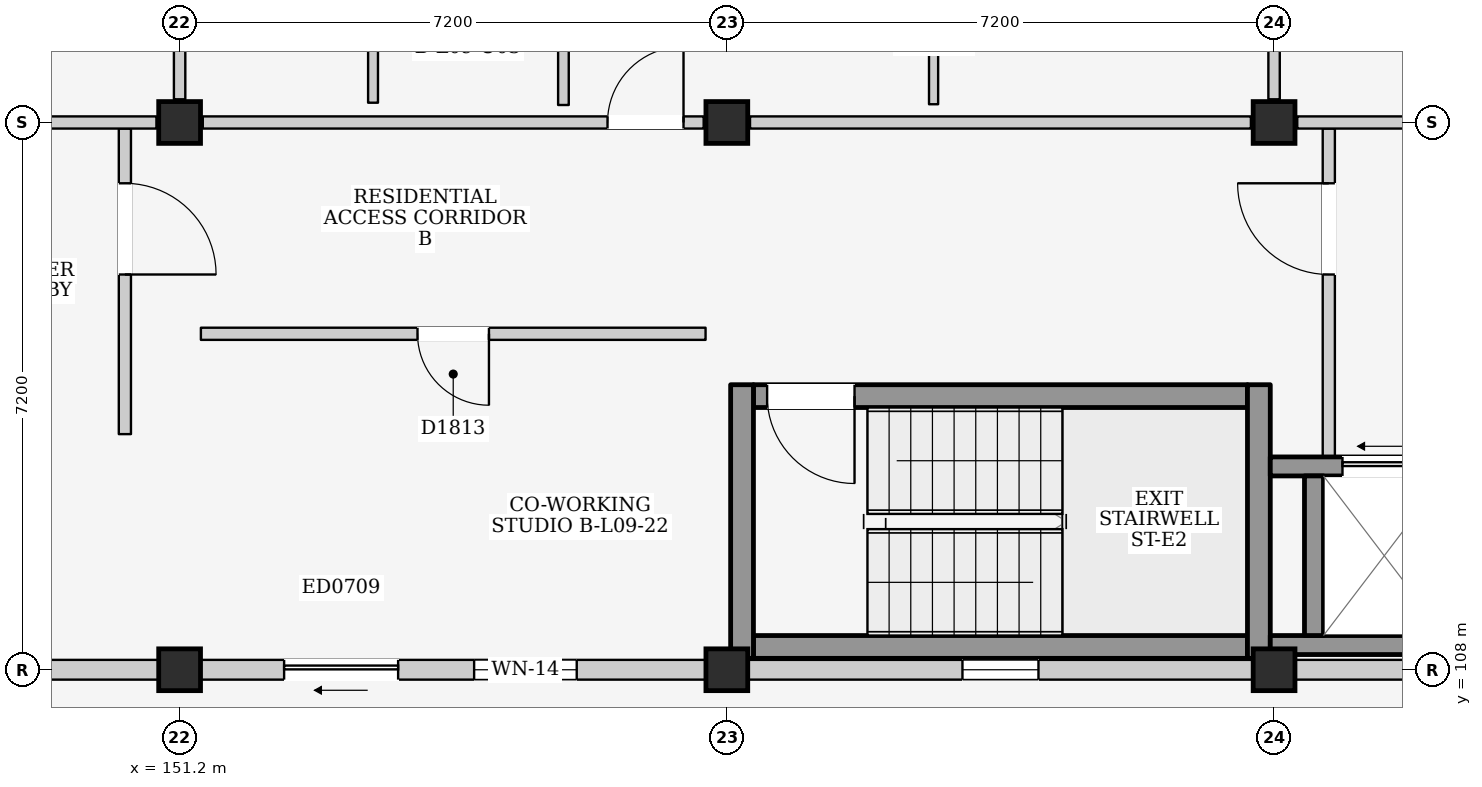
"""IFC4 building model, lengths in metres.
Left out: names, types, materials, properties, quantities, classifications, styles, units other than length and angle.
Written with IfcOpenShell. Run it as: python <this file> out.ifc"""

import sys

from ifc_helpers import new_model, si_unit, direction, frame, frame_2d, origin, origin_2d, place, context, subcontext, project, spatial, rectangle, extrude, element, fill, save


model = new_model("IFC4")
c1 = context("Model", 3, precision=1e-05, world=origin(), true_north=direction((0.0, 1.0)))
c2 = subcontext(c1, "Body", "Model", "MODEL_VIEW")
j1 = project(units=[si_unit("LENGTHUNIT", "METRE"), si_unit("PLANEANGLEUNIT", "RADIAN")], contexts=[c1])
p1 = place(None, origin())
s1 = spatial("IfcSite", under=j1, at=p1, CompositionType="ELEMENT")
p2 = place(p1, origin())
s2 = spatial("IfcBuilding", under=s1, at=p2, CompositionType="ELEMENT")
p3 = place(p2, frame((0.0, 0.0, 31.5)))
s3 = spatial("IfcBuildingStorey", under=s2, at=p3, CompositionType="ELEMENT", Elevation=31.5)
for number, where, z_axis, x_axis in (
    (1, (151.2, 108.0, 0.0), (0.0, 0.0, 1.0), (1.0, 0.0, 0.0)),
    (2, (151.2, 115.2, 0.0), (0.0, 0.0, 1.0), (1.0, 0.0, 0.0)),
    (3, (158.4, 108.0, 0.0), (0.0, 0.0, 1.0), (1.0, 0.0, 0.0)),
    (4, (158.4, 115.2, 0.0), (0.0, 0.0, 1.0), (1.0, 0.0, 0.0)),
    (5, (165.6, 108.0, 0.0), (0.0, 0.0, 1.0), (1.0, 0.0, 0.0)),
    (6, (165.6, 115.2, 0.0), (0.0, 0.0, 1.0), (1.0, 0.0, 0.0)),
):
    element("IfcColumn", number, at=place(p3, frame(where, z_axis=z_axis, x_axis=x_axis)), inside=s3, PredefinedType="COLUMN", context=c2, shape_type="SweptSolid", body=[
        extrude(rectangle(XDim=0.55, YDim=0.55, at=origin_2d()), origin(), (0.0, 0.0, 1.0), 3.3),
    ])
p4 = place(p3, frame((144.275, 108.0, 0.0), z_axis=(0.0, 0.0, 1.0), x_axis=(1.0, 0.0, 0.0)))
e7 = element("IfcWall", 7, at=p4, inside=s3, PredefinedType="ELEMENTEDWALL", context=c2, shape_type="SweptSolid", body=[
    extrude(rectangle(XDim=6.65, YDim=0.26, at=frame_2d((3.325, 0.0))), origin(), (0.0, 0.0, 1.0), 2.465),
])
p5 = place(p4, frame((2.825, 0.0, 1.2)))
e8 = element("IfcOpeningElement", 8, at=p5, cuts=e7, PredefinedType="OPENING", context=c2, shape_type="SweptSolid", body=[
    extrude(rectangle(XDim=1.0, YDim=0.9, at=frame_2d((0.5, 0.45))), frame((0.0, 0.145, 0.0), z_axis=(0.0, -1.0, 0.0), x_axis=(1.0, 0.0, 0.0)), (0.0, 0.0, 1.0), 0.29),
])
p6 = place(p3, frame((151.475, 108.0, 0.0), z_axis=(0.0, 0.0, 1.0), x_axis=(1.0, 0.0, 0.0)))
e9 = element("IfcWall", 9, at=p6, inside=s3, PredefinedType="ELEMENTEDWALL", context=c2, shape_type="SweptSolid", body=[
    extrude(rectangle(XDim=6.65, YDim=0.26, at=frame_2d((3.325, 0.0))), origin(), (0.0, 0.0, 1.0), 2.465),
])
p7 = place(p6, frame((1.1, 0.0, 0.0)))
e10 = element("IfcOpeningElement", 10, at=p7, cuts=e9, PredefinedType="OPENING", context=c2, shape_type="SweptSolid", body=[
    extrude(rectangle(XDim=1.5, YDim=2.12, at=frame_2d((0.75, 1.06))), frame((0.0, 0.145, 0.0), z_axis=(0.0, -1.0, 0.0), x_axis=(1.0, 0.0, 0.0)), (0.0, 0.0, 1.0), 0.29),
])
p8 = place(p6, frame((3.6, 0.0, 0.855)))
e11 = element("IfcOpeningElement", 11, at=p8, cuts=e9, PredefinedType="OPENING", context=c2, shape_type="SweptSolid", body=[
    extrude(rectangle(XDim=1.35, YDim=1.5, at=frame_2d((0.675, 0.75))), frame((0.0, 0.145, 0.0), z_axis=(0.0, -1.0, 0.0), x_axis=(1.0, 0.0, 0.0)), (0.0, 0.0, 1.0), 0.29),
])
p9 = place(p3, frame((158.675, 108.0, 0.0), z_axis=(0.0, 0.0, 1.0), x_axis=(1.0, 0.0, 0.0)))
e12 = element("IfcWall", 12, at=p9, inside=s3, PredefinedType="ELEMENTEDWALL", context=c2, shape_type="SweptSolid", body=[
    extrude(rectangle(XDim=6.65, YDim=0.26, at=frame_2d((3.325, 0.0))), origin(), (0.0, 0.0, 1.0), 2.465),
])
p10 = place(p9, frame((2.825, 0.0, 1.2)))
e13 = element("IfcOpeningElement", 13, at=p10, cuts=e12, PredefinedType="OPENING", context=c2, shape_type="SweptSolid", body=[
    extrude(rectangle(XDim=1.0, YDim=0.9, at=frame_2d((0.5, 0.45))), frame((0.0, 0.145, 0.0), z_axis=(0.0, -1.0, 0.0), x_axis=(1.0, 0.0, 0.0)), (0.0, 0.0, 1.0), 0.29),
])
p11 = place(p3, frame((165.875, 108.0, 0.0), z_axis=(0.0, 0.0, 1.0), x_axis=(1.0, 0.0, 0.0)))
e14 = element("IfcWall", 14, at=p11, inside=s3, PredefinedType="ELEMENTEDWALL", context=c2, shape_type="SweptSolid", body=[
    extrude(rectangle(XDim=6.65, YDim=0.26, at=frame_2d((3.325, 0.0))), origin(), (0.0, 0.0, 1.0), 2.465),
])
p12 = place(p11, frame((2.825, 0.0, 1.2)))
e15 = element("IfcOpeningElement", 15, at=p12, cuts=e14, PredefinedType="OPENING", context=c2, shape_type="SweptSolid", body=[
    extrude(rectangle(XDim=1.0, YDim=0.9, at=frame_2d((0.5, 0.45))), frame((0.0, 0.145, 0.0), z_axis=(0.0, -1.0, 0.0), x_axis=(1.0, 0.0, 0.0)), (0.0, 0.0, 1.0), 0.29),
])
p13 = place(p3, frame((150.48, 111.1, 0.0), z_axis=(0.0, 0.0, 1.0), x_axis=(0.0, 1.0, 0.0)))
e16 = element("IfcWall", 16, at=p13, inside=s3, PredefinedType="PARTITIONING", context=c2, shape_type="SweptSolid", body=[
    extrude(rectangle(XDim=4.02, YDim=0.16, at=frame_2d((2.01, 0.0))), origin(), (0.0, 0.0, 1.0), 3.08),
])
p14 = place(p13, frame((2.1, 0.0, 0.0)))
e17 = element("IfcOpeningElement", 17, at=p14, cuts=e16, PredefinedType="OPENING", context=c2, shape_type="SweptSolid", body=[
    extrude(rectangle(XDim=1.2, YDim=2.2, at=frame_2d((0.6, 1.1))), frame((0.0, 0.095, 0.0), z_axis=(0.0, -1.0, 0.0), x_axis=(1.0, 0.0, 0.0)), (0.0, 0.0, 1.0), 0.19),
])
p15 = place(p3, frame((158.75, 108.3, 0.0), z_axis=(0.0, 0.0, 1.0), x_axis=(1.0, 0.0, 0.0)))
e18 = element("IfcWall", 18, at=p15, inside=s3, PredefinedType="SHEAR", context=c2, shape_type="SweptSolid", body=[
    extrude(rectangle(XDim=6.5, YDim=0.3, at=frame_2d((3.25, 0.0))), origin(), (0.0, 0.0, 1.0), 3.08),
])
p16 = place(p3, frame((158.75, 111.6, 0.0), z_axis=(0.0, 0.0, 1.0), x_axis=(1.0, 0.0, 0.0)))
e19 = element("IfcWall", 19, at=p16, inside=s3, PredefinedType="SHEAR", context=c2, shape_type="SweptSolid", body=[
    extrude(rectangle(XDim=6.5, YDim=0.3, at=frame_2d((3.25, 0.0))), origin(), (0.0, 0.0, 1.0), 3.08),
])
p17 = place(p16, frame((0.18, 0.0, 0.0)))
e20 = element("IfcOpeningElement", 20, at=p17, cuts=e19, PredefinedType="OPENING", context=c2, shape_type="SweptSolid", body=[
    extrude(rectangle(XDim=1.15, YDim=2.2, at=frame_2d((0.575, 1.1))), frame((0.0, 0.165, 0.0), z_axis=(0.0, -1.0, 0.0), x_axis=(1.0, 0.0, 0.0)), (0.0, 0.0, 1.0), 0.33),
])
for number, where, z_axis, x_axis in (
    (21, (158.6, 108.15, 0.0), (0.0, 0.0, 1.0), (0.0, 1.0, 0.0)),
    (22, (165.4, 108.15, 0.0), (0.0, 0.0, 1.0), (0.0, 1.0, 0.0)),
):
    element("IfcWall", number, at=place(p3, frame(where, z_axis=z_axis, x_axis=x_axis)), inside=s3, PredefinedType="SHEAR", context=c2, shape_type="SweptSolid", body=[
        extrude(rectangle(XDim=3.6, YDim=0.3, at=frame_2d((1.8, 0.0))), origin(), (0.0, 0.0, 1.0), 3.08),
    ])
p18 = place(p3, frame((166.32, 110.8, 0.0), z_axis=(0.0, 0.0, 1.0), x_axis=(0.0, 1.0, 0.0)))
e23 = element("IfcWall", 23, at=p18, inside=s3, PredefinedType="PARTITIONING", context=c2, shape_type="SweptSolid", body=[
    extrude(rectangle(XDim=4.32, YDim=0.16, at=frame_2d((2.16, 0.0))), origin(), (0.0, 0.0, 1.0), 3.08),
])
p19 = place(p18, frame((2.4, 0.0, 0.0)))
e24 = element("IfcOpeningElement", 24, at=p19, cuts=e23, PredefinedType="OPENING", context=c2, shape_type="SweptSolid", body=[
    extrude(rectangle(XDim=1.2, YDim=2.2, at=frame_2d((0.6, 1.1))), frame((0.0, 0.095, 0.0), z_axis=(0.0, -1.0, 0.0), x_axis=(1.0, 0.0, 0.0)), (0.0, 0.0, 1.0), 0.19),
])
p20 = place(p3, frame((165.55, 108.325, 0.0), z_axis=(0.0, 0.0, 1.0), x_axis=(1.0, 0.0, 0.0)))
e25 = element("IfcWall", 25, at=p20, inside=s3, PredefinedType="SHEAR", context=c2, shape_type="SweptSolid", body=[
    extrude(rectangle(XDim=2.55, YDim=0.25, at=frame_2d((1.275, 0.0))), origin(), (0.0, 0.0, 1.0), 3.08),
])
p21 = place(p3, frame((165.55, 110.675, 0.0), z_axis=(0.0, 0.0, 1.0), x_axis=(1.0, 0.0, 0.0)))
e26 = element("IfcWall", 26, at=p21, inside=s3, PredefinedType="SHEAR", context=c2, shape_type="SweptSolid", body=[
    extrude(rectangle(XDim=2.55, YDim=0.25, at=frame_2d((1.275, 0.0))), origin(), (0.0, 0.0, 1.0), 3.08),
])
p22 = place(p21, frame((0.95, 0.0, 0.0)))
e27 = element("IfcOpeningElement", 27, at=p22, cuts=e26, PredefinedType="OPENING", context=c2, shape_type="SweptSolid", body=[
    extrude(rectangle(XDim=1.1, YDim=2.15, at=frame_2d((0.55, 1.075))), frame((0.0, 0.14, 0.0), z_axis=(0.0, -1.0, 0.0), x_axis=(1.0, 0.0, 0.0)), (0.0, 0.0, 1.0), 0.28),
])
p23 = place(p3, frame((166.125, 108.45, 0.0), z_axis=(0.0, 0.0, 1.0), x_axis=(0.0, 1.0, 0.0)))
e28 = element("IfcWall", 28, at=p23, inside=s3, PredefinedType="SHEAR", context=c2, shape_type="SweptSolid", body=[
    extrude(rectangle(XDim=2.1, YDim=0.25, at=frame_2d((1.05, 0.0))), origin(), (0.0, 0.0, 1.0), 3.08),
])
p24 = place(p3, frame((144.305, 115.2, 0.0), z_axis=(0.0, 0.0, 1.0), x_axis=(1.0, 0.0, 0.0)))
e29 = element("IfcWall", 29, at=p24, inside=s3, PredefinedType="PARTITIONING", context=c2, shape_type="SweptSolid", body=[
    extrude(rectangle(XDim=6.59, YDim=0.16, at=frame_2d((3.295, 0.0))), origin(), (0.0, 0.0, 1.0), 2.465),
])
p25 = place(p24, frame((4.145, 0.0, 0.0)))
e30 = element("IfcOpeningElement", 30, at=p25, cuts=e29, PredefinedType="OPENING", context=c2, shape_type="SweptSolid", body=[
    extrude(rectangle(XDim=1.0, YDim=2.15, at=frame_2d((0.5, 1.075))), frame((0.0, 0.095, 0.0), z_axis=(0.0, -1.0, 0.0), x_axis=(1.0, 0.0, 0.0)), (0.0, 0.0, 1.0), 0.19),
])
p26 = place(p3, frame((151.2, 115.505, 0.0), z_axis=(0.0, 0.0, 1.0), x_axis=(0.0, 1.0, 0.0)))
e31 = element("IfcWall", 31, at=p26, inside=s3, PredefinedType="PARTITIONING", context=c2, shape_type="SweptSolid", body=[
    extrude(rectangle(XDim=6.59, YDim=0.15, at=frame_2d((3.295, 0.0))), origin(), (0.0, 0.0, 1.0), 2.565),
])
p27 = place(p3, frame((151.505, 115.2, 0.0), z_axis=(0.0, 0.0, 1.0), x_axis=(1.0, 0.0, 0.0)))
e32 = element("IfcWall", 32, at=p27, inside=s3, PredefinedType="PARTITIONING", context=c2, shape_type="SweptSolid", body=[
    extrude(rectangle(XDim=6.59, YDim=0.16, at=frame_2d((3.295, 0.0))), origin(), (0.0, 0.0, 1.0), 2.465),
])
p28 = place(p27, frame((5.325, 0.0, 0.0)))
e33 = element("IfcOpeningElement", 33, at=p28, cuts=e32, PredefinedType="OPENING", context=c2, shape_type="SweptSolid", body=[
    extrude(rectangle(XDim=1.0, YDim=2.15, at=frame_2d((0.5, 1.075))), frame((0.0, 0.095, 0.0), z_axis=(0.0, -1.0, 0.0), x_axis=(1.0, 0.0, 0.0)), (0.0, 0.0, 1.0), 0.19),
])
p29 = place(p3, frame((158.705, 115.2, 0.0), z_axis=(0.0, 0.0, 1.0), x_axis=(1.0, 0.0, 0.0)))
e34 = element("IfcWall", 34, at=p29, inside=s3, PredefinedType="PARTITIONING", context=c2, shape_type="SweptSolid", body=[
    extrude(rectangle(XDim=6.59, YDim=0.16, at=frame_2d((3.295, 0.0))), origin(), (0.0, 0.0, 1.0), 2.465),
])
p30 = place(p3, frame((165.6, 115.505, 0.0), z_axis=(0.0, 0.0, 1.0), x_axis=(0.0, 1.0, 0.0)))
e35 = element("IfcWall", 35, at=p30, inside=s3, PredefinedType="PARTITIONING", context=c2, shape_type="SweptSolid", body=[
    extrude(rectangle(XDim=6.59, YDim=0.15, at=frame_2d((3.295, 0.0))), origin(), (0.0, 0.0, 1.0), 2.565),
])
p31 = place(p3, frame((153.745, 115.46, 0.0), z_axis=(0.0, 0.0, 1.0), x_axis=(0.0, 1.0, 0.0)))
e36 = element("IfcWall", 36, at=p31, inside=s3, PredefinedType="PARTITIONING", context=c2, shape_type="SweptSolid", body=[
    extrude(rectangle(XDim=3.04, YDim=0.13, at=frame_2d((1.52, 0.0))), origin(), (0.0, 0.0, 1.0), 3.08),
])
p32 = place(p3, frame((156.25, 115.43, 0.0), z_axis=(0.0, 0.0, 1.0), x_axis=(0.0, 1.0, 0.0)))
e37 = element("IfcWall", 37, at=p32, inside=s3, PredefinedType="PARTITIONING", context=c2, shape_type="SweptSolid", body=[
    extrude(rectangle(XDim=3.06, YDim=0.14, at=frame_2d((1.53, 0.0))), origin(), (0.0, 0.0, 1.0), 3.08),
])
p33 = place(p3, frame((161.12, 115.44, 0.0), z_axis=(0.0, 0.0, 1.0), x_axis=(0.0, 1.0, 0.0)))
e38 = element("IfcWall", 38, at=p33, inside=s3, PredefinedType="PARTITIONING", context=c2, shape_type="SweptSolid", body=[
    extrude(rectangle(XDim=3.04, YDim=0.12, at=frame_2d((1.52, 0.0))), origin(), (0.0, 0.0, 1.0), 3.08),
])
p34 = place(p33, frame((1.04, 0.0, 0.0)))
e39 = element("IfcOpeningElement", 39, at=p34, cuts=e38, PredefinedType="OPENING", context=c2, shape_type="SweptSolid", body=[
    extrude(rectangle(XDim=0.96, YDim=2.15, at=frame_2d((0.48, 1.075))), frame((0.0, 0.075, 0.0), z_axis=(0.0, -1.0, 0.0), x_axis=(1.0, 0.0, 0.0)), (0.0, 0.0, 1.0), 0.15),
])
p35 = place(p3, frame((165.905, 115.2, 0.0), z_axis=(0.0, 0.0, 1.0), x_axis=(1.0, 0.0, 0.0)))
e40 = element("IfcWall", 40, at=p35, inside=s3, PredefinedType="PARTITIONING", context=c2, shape_type="SweptSolid", body=[
    extrude(rectangle(XDim=6.59, YDim=0.16, at=frame_2d((3.295, 0.0))), origin(), (0.0, 0.0, 1.0), 2.465),
])
p36 = place(p35, frame((4.145, 0.0, 0.0)))
e41 = element("IfcOpeningElement", 41, at=p36, cuts=e40, PredefinedType="OPENING", context=c2, shape_type="SweptSolid", body=[
    extrude(rectangle(XDim=1.0, YDim=2.15, at=frame_2d((0.5, 1.075))), frame((0.0, 0.095, 0.0), z_axis=(0.0, -1.0, 0.0), x_axis=(1.0, 0.0, 0.0)), (0.0, 0.0, 1.0), 0.19),
])
p37 = place(p3, frame((151.48, 112.42, 0.0), z_axis=(0.0, 0.0, 1.0), x_axis=(1.0, 0.0, 0.0)))
e42 = element("IfcWall", 42, at=p37, inside=s3, PredefinedType="PARTITIONING", context=c2, shape_type="SweptSolid", body=[
    extrude(rectangle(XDim=6.64, YDim=0.16, at=frame_2d((3.32, 0.0))), origin(), (0.0, 0.0, 1.0), 3.08),
])
p38 = place(p37, frame((2.85, 0.0, 0.0)))
e43 = element("IfcOpeningElement", 43, at=p38, cuts=e42, PredefinedType="OPENING", context=c2, shape_type="SweptSolid", body=[
    extrude(rectangle(XDim=0.94, YDim=2.12, at=frame_2d((0.47, 1.06))), frame((0.0, 0.095, 0.0), z_axis=(0.0, -1.0, 0.0), x_axis=(1.0, 0.0, 0.0)), (0.0, 0.0, 1.0), 0.19),
])
p39 = place(p7, frame((1.5, 0.0, 0.0), z_axis=(0.0, 0.0, 1.0), x_axis=(-1.0, 0.0, 0.0)))
e44 = element("IfcDoor", 44, at=p39, inside=s3, OperationType="SLIDING_TO_LEFT", PredefinedType="DOOR", context=c2, shape_type="SweptSolid", body=[
    extrude(rectangle(XDim=1.5, YDim=2.12, at=frame_2d((0.75, 1.06))), frame((0.0, 0.025, 0.0), z_axis=(0.0, -1.0, 0.0), x_axis=(1.0, 0.0, 0.0)), (0.0, 0.0, 1.0), 0.05),
])
fill(e10, e44)
p40 = place(p8, origin())
e45 = element("IfcWindow", 45, at=p40, inside=s3, PartitioningType="SINGLE_PANEL", PredefinedType="WINDOW", context=c2, shape_type="SweptSolid", body=[
    extrude(rectangle(XDim=1.35, YDim=1.5, at=frame_2d((0.675, 0.75))), frame((0.0, 0.03, 0.0), z_axis=(0.0, -1.0, 0.0), x_axis=(1.0, 0.0, 0.0)), (0.0, 0.0, 1.0), 0.06),
])
fill(e11, e45)
p41 = place(p10, origin())
e46 = element("IfcWindow", 46, at=p41, inside=s3, PartitioningType="SINGLE_PANEL", PredefinedType="WINDOW", context=c2, shape_type="SweptSolid", body=[
    extrude(rectangle(XDim=1.0, YDim=0.9, at=frame_2d((0.5, 0.45))), frame((0.0, 0.03, 0.0), z_axis=(0.0, -1.0, 0.0), x_axis=(1.0, 0.0, 0.0)), (0.0, 0.0, 1.0), 0.06),
])
fill(e13, e46)
p42 = place(p14, frame((1.2, 0.0, 0.0), z_axis=(0.0, 0.0, 1.0), x_axis=(-1.0, 0.0, 0.0)))
e47 = element("IfcDoor", 47, at=p42, inside=s3, OperationType="SINGLE_SWING_RIGHT", PredefinedType="DOOR", context=c2, shape_type="SweptSolid", body=[
    extrude(rectangle(XDim=1.2, YDim=2.2, at=frame_2d((0.6, 1.1))), frame((0.0, 0.025, 0.0), z_axis=(0.0, -1.0, 0.0), x_axis=(1.0, 0.0, 0.0)), (0.0, 0.0, 1.0), 0.05),
])
fill(e17, e47)
p43 = place(p17, frame((1.15, 0.0, 0.0), z_axis=(0.0, 0.0, 1.0), x_axis=(-1.0, 0.0, 0.0)))
e48 = element("IfcDoor", 48, at=p43, inside=s3, OperationType="SINGLE_SWING_LEFT", PredefinedType="DOOR", context=c2, shape_type="SweptSolid", body=[
    extrude(rectangle(XDim=1.15, YDim=2.2, at=frame_2d((0.575, 1.1))), frame((0.0, 0.025, 0.0), z_axis=(0.0, -1.0, 0.0), x_axis=(1.0, 0.0, 0.0)), (0.0, 0.0, 1.0), 0.05),
])
fill(e20, e48)
p44 = place(p19, origin())
e49 = element("IfcDoor", 49, at=p44, inside=s3, OperationType="SINGLE_SWING_RIGHT", PredefinedType="DOOR", context=c2, shape_type="SweptSolid", body=[
    extrude(rectangle(XDim=1.2, YDim=2.2, at=frame_2d((0.6, 1.1))), frame((0.0, 0.025, 0.0), z_axis=(0.0, -1.0, 0.0), x_axis=(1.0, 0.0, 0.0)), (0.0, 0.0, 1.0), 0.05),
])
fill(e24, e49)
p45 = place(p22, origin())
e50 = element("IfcDoor", 50, at=p45, inside=s3, OperationType="SLIDING_TO_LEFT", PredefinedType="DOOR", context=c2, shape_type="SweptSolid", body=[
    extrude(rectangle(XDim=1.1, YDim=2.15, at=frame_2d((0.55, 1.075))), frame((0.0, 0.025, 0.0), z_axis=(0.0, -1.0, 0.0), x_axis=(1.0, 0.0, 0.0)), (0.0, 0.0, 1.0), 0.05),
])
fill(e27, e50)
p46 = place(p28, origin())
e51 = element("IfcDoor", 51, at=p46, inside=s3, OperationType="SINGLE_SWING_RIGHT", PredefinedType="DOOR", context=c2, shape_type="SweptSolid", body=[
    extrude(rectangle(XDim=1.0, YDim=2.15, at=frame_2d((0.5, 1.075))), frame((0.0, 0.025, 0.0), z_axis=(0.0, -1.0, 0.0), x_axis=(1.0, 0.0, 0.0)), (0.0, 0.0, 1.0), 0.05),
])
fill(e33, e51)
p47 = place(p38, frame((0.94, 0.0, 0.0), z_axis=(0.0, 0.0, 1.0), x_axis=(-1.0, 0.0, 0.0)))
e52 = element("IfcDoor", 52, at=p47, inside=s3, OperationType="SINGLE_SWING_LEFT", PredefinedType="DOOR", context=c2, shape_type="SweptSolid", body=[
    extrude(rectangle(XDim=0.94, YDim=2.12, at=frame_2d((0.47, 1.06))), frame((0.0, 0.025, 0.0), z_axis=(0.0, -1.0, 0.0), x_axis=(1.0, 0.0, 0.0)), (0.0, 0.0, 1.0), 0.05),
])
fill(e43, e52)
save(model, sys.argv[1])
